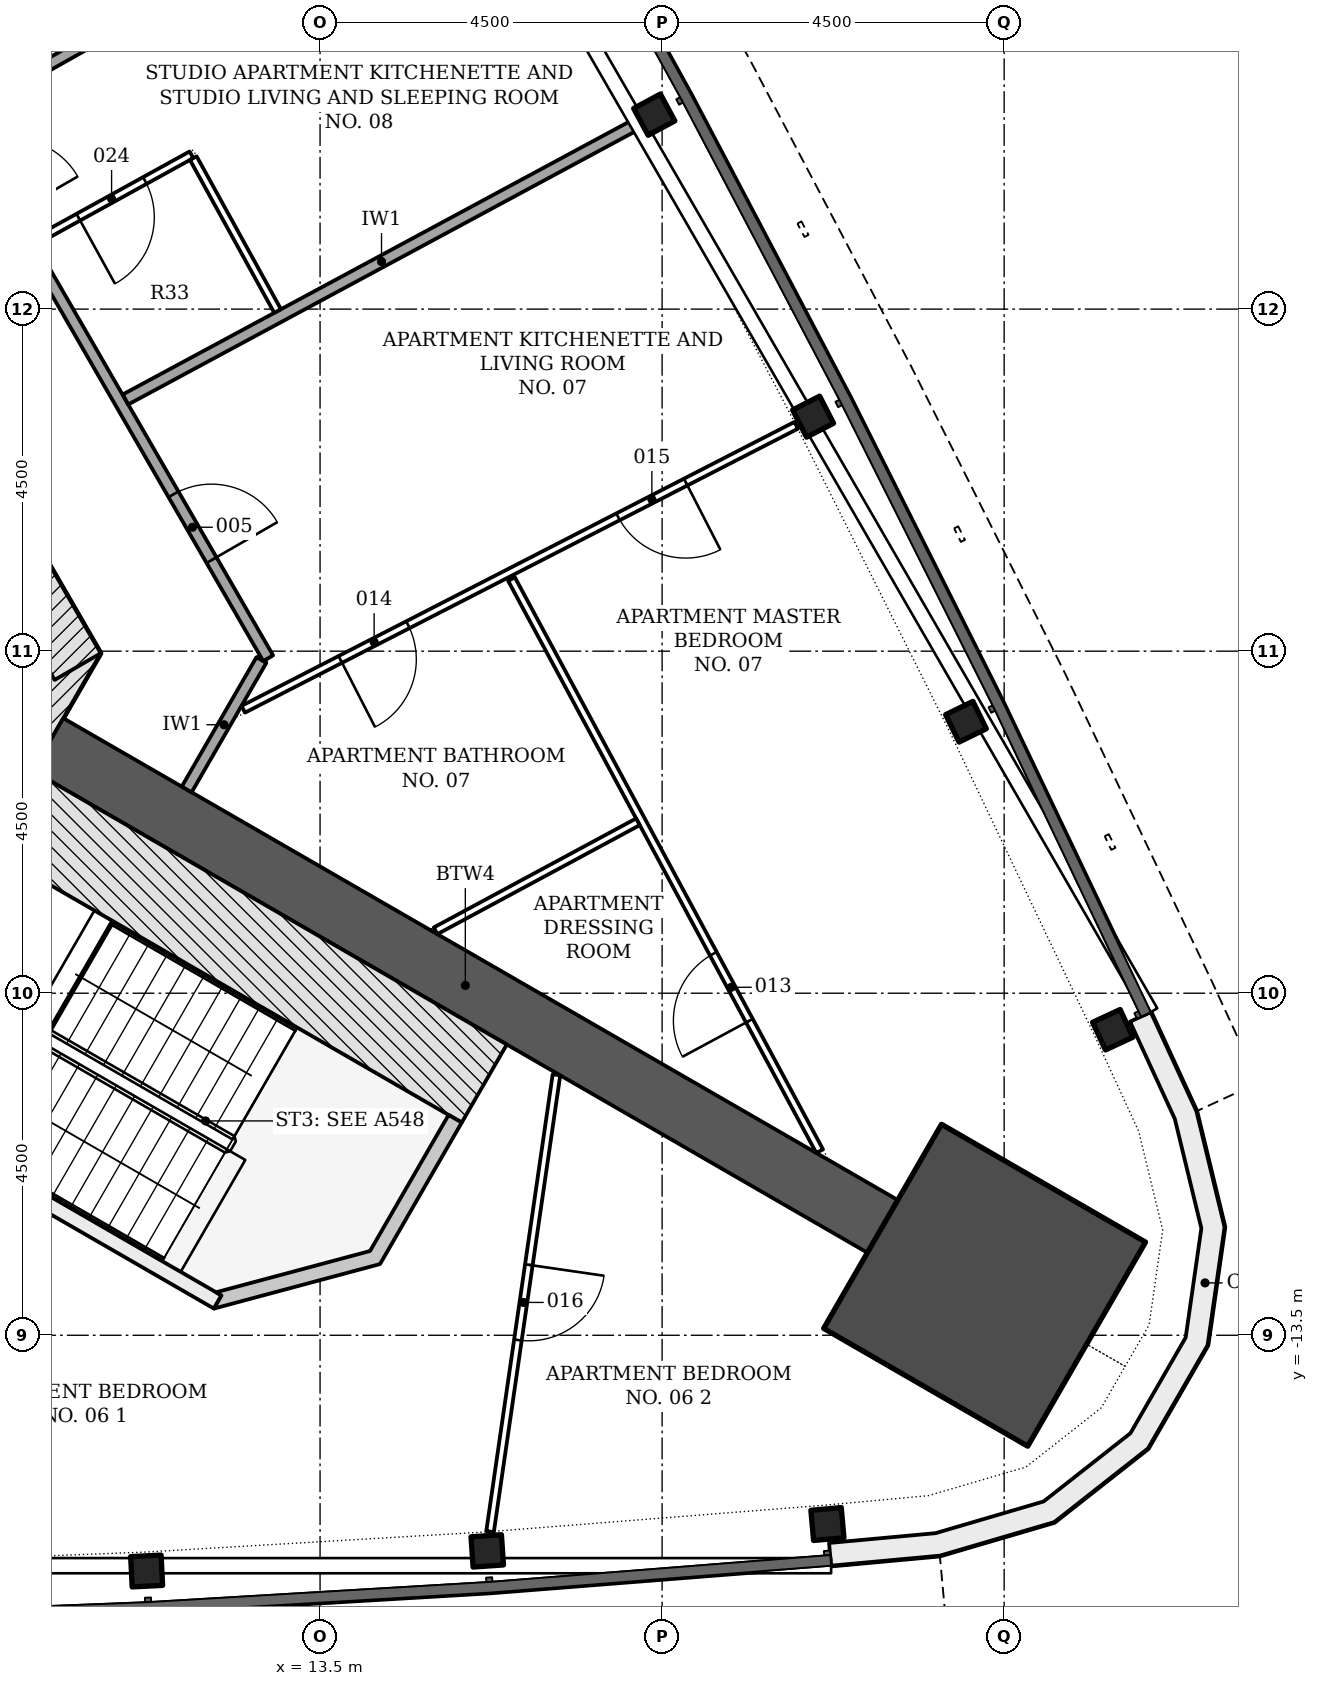
"""IFC4 building model, lengths in metres.
Left out: names, types, materials, properties, quantities, classifications, styles, units other than length and angle.
Written with IfcOpenShell. Run it as: python <this file> out.ifc"""

import sys

from ifc_helpers import new_model, si_unit, direction, frame, frame_2d, origin, origin_2d, place, context, subcontext, project, spatial, polyline, rectangle, i_section, outline, extrude, element, fill, save


model = new_model("IFC4")
c1 = context("Model", 3, precision=1e-05, world=origin(), true_north=direction((0.0, 1.0)))
c2 = subcontext(c1, "Body", "Model", "MODEL_VIEW")
j1 = project(units=[si_unit("LENGTHUNIT", "METRE"), si_unit("PLANEANGLEUNIT", "RADIAN")], contexts=[c1])
p1 = place(None, origin())
s1 = spatial("IfcSite", under=j1, at=p1, CompositionType="ELEMENT")
p2 = place(p1, origin())
s2 = spatial("IfcBuilding", under=s1, at=p2, CompositionType="ELEMENT")
p3 = place(p2, frame((0.0, 0.0, 98.7)))
s3 = spatial("IfcBuildingStorey", under=s2, at=p3, CompositionType="ELEMENT", Elevation=98.7)
p4 = place(p3, frame((8.926, -6.753, -0.2), z_axis=(0.0, 0.0, 1.0), x_axis=(0.500042739161, 0.866000726912, 0.0)))
e1 = element("IfcWall", 1, at=p4, inside=s3, PredefinedType="SHEAR", context=c2, shape_type="SweptSolid", body=[
    extrude(rectangle(XDim=2.771, YDim=0.7, at=frame_2d((1.386, 0.0))), origin(), (0.0, 0.0, 1.0), 3.6),
])
p5 = place(p3, frame((10.311, -4.703, -0.2), z_axis=(0.0, 0.0, 1.0), x_axis=(-0.500001446645, 0.866024568562, 0.0)))
e2 = element("IfcWall", 2, at=p5, inside=s3, PredefinedType="SHEAR", context=c2, shape_type="SweptSolid", body=[
    extrude(rectangle(XDim=18.458, YDim=0.7, at=frame_2d((9.229, 0.0))), origin(), (0.0, 0.0, 1.0), 3.6),
])
p6 = place(p5, frame((6.5, 0.0, 0.2)))
e3 = element("IfcOpeningElement", 3, at=p6, cuts=e2, PredefinedType="OPENING", context=c2, shape_type="SweptSolid", body=[
    extrude(rectangle(XDim=1.0, YDim=2.1, at=frame_2d((0.5, 1.05))), frame((0.0, 0.36, 0.0), z_axis=(0.0, -1.0, 0.0), x_axis=(1.0, 0.0, 0.0)), (0.0, 0.0, 1.0), 0.72),
])
p7 = place(p5, frame((2.902, 0.0, 0.2)))
e4 = element("IfcOpeningElement", 4, at=p7, cuts=e2, PredefinedType="OPENING", context=c2, shape_type="SweptSolid", body=[
    extrude(rectangle(XDim=0.9, YDim=2.1, at=frame_2d((0.45, 1.05))), frame((0.0, 0.36, 0.0), z_axis=(0.0, -1.0, 0.0), x_axis=(1.0, 0.0, 0.0)), (0.0, 0.0, 1.0), 0.72),
])
p8 = place(p5, frame((8.75, 0.0, 0.2)))
e5 = element("IfcOpeningElement", 5, at=p8, cuts=e2, PredefinedType="OPENING", context=c2, shape_type="SweptSolid", body=[
    extrude(rectangle(XDim=1.0, YDim=2.1, at=frame_2d((0.5, 1.05))), frame((0.0, 0.36, 0.0), z_axis=(0.0, -1.0, 0.0), x_axis=(1.0, 0.0, 0.0)), (0.0, 0.0, 1.0), 0.72),
])
p9 = place(p5, frame((13.977, 0.0, 0.2)))
e6 = element("IfcOpeningElement", 6, at=p9, cuts=e2, PredefinedType="OPENING", context=c2, shape_type="SweptSolid", body=[
    extrude(rectangle(XDim=0.9, YDim=2.1, at=frame_2d((0.45, 1.05))), frame((0.0, 0.36, 0.0), z_axis=(0.0, -1.0, 0.0), x_axis=(1.0, 0.0, 0.0)), (0.0, 0.0, 1.0), 0.72),
])
p10 = place(p3, frame((9.922, -5.728, -0.2), z_axis=(0.0, 0.0, 1.0), x_axis=(0.866029086277, -0.499993621681, 0.0)))
e7 = element("IfcWall", 7, at=p10, inside=s3, PredefinedType="SHEAR", context=c2, shape_type="SweptSolid", body=[
    extrude(rectangle(XDim=12.677, YDim=0.8, at=frame_2d((6.339, 0.0))), origin(), (0.0, 0.0, 1.0), 3.6),
])
p11 = place(p3, frame((22.243, -12.842, -0.2), z_axis=(0.0, 0.0, 1.0), x_axis=(0.866025403784, -0.5, 0.0)))
e8 = element("IfcColumn", 8, at=p11, inside=s3, PredefinedType="COLUMN", context=c2, shape_type="SweptSolid", body=[
    extrude(rectangle(XDim=3.1, YDim=3.1, at=origin_2d()), origin(), (0.0, 0.0, 1.0), 3.6),
])
for number, where, z_axis, x_axis in (
    (9, (11.219, -16.601, -0.2), (0.0, 0.0, 1.0), (0.999, 0.049, 0.0)),
    (10, (15.7, -16.336, -0.2), (0.0, 0.0, 1.0), (0.998, 0.069, 0.0)),
    (11, (20.175, -15.983, -0.2), (0.0, 0.0, 1.0), (0.996, 0.088, 0.0)),
    (12, (23.929, -9.48, -0.2), (0.0, 0.0, 1.0), (-0.421, 0.907, 0.0)),
    (13, (21.998, -5.428, -0.2), (0.0, 0.0, 1.0), (-0.439, 0.898, 0.0)),
    (14, (19.986, -1.415, -0.2), (0.0, 0.0, 1.0), (-0.457, 0.89, 0.0)),
    (15, (17.897, 2.558, -0.2), (0.0, 0.0, 1.0), (-0.474, 0.88, 0.0)),
):
    element("IfcColumn", number, at=place(p3, frame(where, z_axis=z_axis, x_axis=x_axis)), inside=s3, PredefinedType="COLUMN", context=c2, shape_type="SweptSolid", body=[
        extrude(i_section(OverallWidth=0.401, OverallDepth=0.399, WebThickness=0.025, FlangeThickness=0.04, FilletRadius=0.015, at=origin_2d()), origin(), (0.0, 0.0, 1.0), 3.6),
    ])
p12 = place(p3, origin())
e16 = element("IfcWall", 16, at=p12, inside=s3, PredefinedType="NOTDEFINED", context=c2, shape_type="SweptSolid", body=[
    extrude(outline(polyline([(20.224, -16.531), (21.654, -16.4), (23.159, -15.958), (24.392, -14.989), (25.177, -13.63), (25.4, -12.077), (25.03, -10.553), (24.428, -9.249), (24.156, -9.374), (24.745, -10.652), (25.094, -12.092), (24.888, -13.53), (24.161, -14.789), (23.019, -15.687), (21.597, -16.104), (20.196, -16.232), (20.224, -16.531)])), origin(), (0.0, 0.0, 1.0), 3.3),
])
p13 = place(p3, frame((7.304, -10.262, -0.2), z_axis=(0.0, 0.0, 1.0), x_axis=(0.866026594901, -0.49999793692, 0.0)))
e17 = element("IfcWall", 17, at=p13, inside=s3, PredefinedType="SHEAR", context=c2, shape_type="SweptSolid", body=[
    extrude(rectangle(XDim=5.6, YDim=0.2, at=frame_2d((2.8, 0.0))), origin(), (0.0, 0.0, 1.0), 3.6),
])
p14 = place(p13, frame((0.45, 0.0, 0.2)))
e18 = element("IfcOpeningElement", 18, at=p14, cuts=e17, PredefinedType="OPENING", context=c2, shape_type="SweptSolid", body=[
    extrude(rectangle(XDim=1.2, YDim=2.1, at=frame_2d((0.6, 1.05))), frame((0.0, 0.11, 0.0), z_axis=(0.0, -1.0, 0.0), x_axis=(1.0, 0.0, 0.0)), (0.0, 0.0, 1.0), 0.22),
])
p15 = place(p3, frame((9.425, -6.588, -0.2), z_axis=(0.0, 0.0, 1.0), x_axis=(0.866018442252, -0.500012057535, 0.0)))
e19 = element("IfcWall", 19, at=p15, inside=s3, PredefinedType="SHEAR", context=c2, shape_type="SweptSolid", body=[
    extrude(rectangle(XDim=7.2, YDim=1.186, at=frame_2d((3.6, 0.0))), origin(), (0.0, 0.0, 1.0), 3.6),
])
p16 = place(p3, frame((0.0, 0.0, -0.2)))
e20 = element("IfcWall", 20, at=p16, inside=s3, PredefinedType="SHEAR", context=c2, shape_type="SweptSolid", body=[
    extrude(outline(polyline([(12.104, -13.149), (14.289, -12.563), (15.364, -10.701), (15.191, -10.601), (14.157, -12.392), (12.132, -12.934), (12.204, -12.976), (12.204, -12.976), (12.204, -12.976), (12.204, -12.976), (12.204, -12.976), (12.204, -12.976), (12.204, -12.976), (12.204, -12.976), (12.204, -12.976), (12.204, -12.976), (12.204, -12.976), (12.204, -12.976), (12.204, -12.976), (12.204, -12.976), (12.204, -12.976), (12.204, -12.976), (12.204, -12.976), (12.104, -13.149)])), origin(), (0.0, 0.0, 1.0), 3.6),
])
p17 = place(p3, frame((5.289, 8.446, 0.0), z_axis=(0.0, 0.0, 1.0), x_axis=(0.499996620721, -0.866027354803, 0.0)))
e21 = element("IfcWall", 21, at=p17, inside=s3, PredefinedType="PARTITIONING", context=c2, shape_type="SweptSolid", body=[
    extrude(rectangle(XDim=15.057, YDim=0.15, at=frame_2d((7.528, 0.0))), origin(), (0.0, 0.0, 1.0), 2.778),
])
p18 = place(p17, frame((12.566, 0.0, 0.0)))
e22 = element("IfcOpeningElement", 22, at=p18, cuts=e21, PredefinedType="OPENING", context=c2, shape_type="SweptSolid", body=[
    extrude(rectangle(XDim=1.0, YDim=2.1, at=frame_2d((0.5, 1.05))), frame((0.0, 0.085, 0.0), z_axis=(0.0, -1.0, 0.0), x_axis=(1.0, 0.0, 0.0)), (0.0, 0.0, 1.0), 0.17),
])
p19 = place(p17, frame((7.316, 0.0, 0.0)))
e23 = element("IfcOpeningElement", 23, at=p19, cuts=e21, PredefinedType="OPENING", context=c2, shape_type="SweptSolid", body=[
    extrude(rectangle(XDim=1.0, YDim=2.1, at=frame_2d((0.5, 1.05))), frame((0.0, 0.085, 0.0), z_axis=(0.0, -1.0, 0.0), x_axis=(1.0, 0.0, 0.0)), (0.0, 0.0, 1.0), 0.17),
])
p20 = place(p17, frame((5.357, 0.0, 0.0)))
e24 = element("IfcOpeningElement", 24, at=p20, cuts=e21, PredefinedType="OPENING", context=c2, shape_type="SweptSolid", body=[
    extrude(rectangle(XDim=1.0, YDim=2.1, at=frame_2d((0.5, 1.05))), frame((0.0, 0.085, 0.0), z_axis=(0.0, -1.0, 0.0), x_axis=(1.0, 0.0, 0.0)), (0.0, 0.0, 1.0), 0.17),
])
p21 = place(p3, frame((11.745, -6.319, 0.0), z_axis=(0.0, 0.0, 1.0), x_axis=(0.500012721296, 0.866018059016, 0.0)))
e25 = element("IfcWall", 25, at=p21, inside=s3, PredefinedType="PARTITIONING", context=c2, shape_type="SweptSolid", body=[
    extrude(rectangle(XDim=1.966, YDim=0.15, at=frame_2d((0.983, 0.0))), origin(), (0.0, 0.0, 1.0), 2.778),
])
p22 = place(p3, frame((15.511, 6.366, 0.0), z_axis=(0.0, 0.0, 1.0), x_axis=(-0.870902291502, -0.491456202175, 0.0)))
e26 = element("IfcWall", 26, at=p22, inside=s3, PredefinedType="PARTITIONING", context=c2, shape_type="SweptSolid", body=[
    extrude(rectangle(XDim=7.738, YDim=0.15, at=frame_2d((3.869, 0.0))), origin(), (0.0, 0.0, 1.0), 2.778),
])
p23 = place(p3, frame((17.677, 2.44, 0.0), z_axis=(0.0, 0.0, 1.0), x_axis=(-0.880400392736, -0.47423111293, 0.0)))
e27 = element("IfcWall", 27, at=p23, inside=s3, PredefinedType="PARTITIONING", context=c2, shape_type="SweptSolid", body=[
    extrude(rectangle(XDim=7.651, YDim=0.15, at=frame_2d((3.826, 0.0))), origin(), (0.0, 0.0, 1.0), 2.778),
])
p24 = place(p3, frame((20.073, -11.078, 0.0), z_axis=(0.0, 0.0, 1.0), x_axis=(-0.474207115322, 0.880413318719, 0.0)))
e28 = element("IfcWall", 28, at=p24, inside=s3, PredefinedType="PARTITIONING", context=c2, shape_type="SweptSolid", body=[
    extrude(rectangle(XDim=8.548, YDim=0.1, at=frame_2d((4.274, 0.0))), origin(), (0.0, 0.0, 1.0), 2.778),
])
p25 = place(p24, frame((1.949, 0.0, 0.0)))
e29 = element("IfcOpeningElement", 29, at=p25, cuts=e28, PredefinedType="OPENING", context=c2, shape_type="SweptSolid", body=[
    extrude(rectangle(XDim=1.0, YDim=2.1, at=frame_2d((0.5, 1.05))), frame((0.0, 0.06, 0.0), z_axis=(0.0, -1.0, 0.0), x_axis=(1.0, 0.0, 0.0)), (0.0, 0.0, 1.0), 0.12),
])
p26 = place(p3, frame((19.764, -1.529, 0.0), z_axis=(0.0, 0.0, 1.0), x_axis=(-0.889562755555, -0.456812985728, 0.0)))
e30 = element("IfcWall", 30, at=p26, inside=s3, PredefinedType="PARTITIONING", context=c2, shape_type="SweptSolid", body=[
    extrude(rectangle(XDim=8.177, YDim=0.1, at=frame_2d((4.089, 0.0))), origin(), (0.0, 0.0, 1.0), 2.778),
])
p27 = place(p26, frame((5.742, 0.0, 0.0)))
e31 = element("IfcOpeningElement", 31, at=p27, cuts=e30, PredefinedType="OPENING", context=c2, shape_type="SweptSolid", body=[
    extrude(rectangle(XDim=1.0, YDim=2.1, at=frame_2d((0.5, 1.05))), frame((0.0, 0.06, 0.0), z_axis=(0.0, -1.0, 0.0), x_axis=(1.0, 0.0, 0.0)), (0.0, 0.0, 1.0), 0.12),
])
p28 = place(p26, frame((1.635, 0.0, 0.0)))
e32 = element("IfcOpeningElement", 32, at=p28, cuts=e30, PredefinedType="OPENING", context=c2, shape_type="SweptSolid", body=[
    extrude(rectangle(XDim=1.0, YDim=2.1, at=frame_2d((0.5, 1.05))), frame((0.0, 0.06, 0.0), z_axis=(0.0, -1.0, 0.0), x_axis=(1.0, 0.0, 0.0)), (0.0, 0.0, 1.0), 0.12),
])
p29 = place(p3, frame((16.61, -10.073, 0.0), z_axis=(0.0, 0.0, 1.0), x_axis=(-0.143841065588, -0.989600802269, 0.0)))
e33 = element("IfcWall", 33, at=p29, inside=s3, PredefinedType="PARTITIONING", context=c2, shape_type="SweptSolid", body=[
    extrude(rectangle(XDim=6.073, YDim=0.1, at=frame_2d((3.037, 0.0))), origin(), (0.0, 0.0, 1.0), 2.923),
])
p30 = place(p29, frame((2.526, 0.0, 0.0)))
e34 = element("IfcOpeningElement", 34, at=p30, cuts=e33, PredefinedType="OPENING", context=c2, shape_type="SweptSolid", body=[
    extrude(rectangle(XDim=1.0, YDim=2.1, at=frame_2d((0.5, 1.05))), frame((0.0, 0.06, 0.0), z_axis=(0.0, -1.0, 0.0), x_axis=(1.0, 0.0, 0.0)), (0.0, 0.0, 1.0), 0.12),
])
p31 = place(p3, frame((17.682, -6.745, 0.0), z_axis=(0.0, 0.0, 1.0), x_axis=(-0.880419251007, -0.474196101267, 0.0)))
e35 = element("IfcWall", 35, at=p31, inside=s3, PredefinedType="PARTITIONING", context=c2, shape_type="SweptSolid", body=[
    extrude(rectangle(XDim=3.024, YDim=0.1, at=frame_2d((1.512, 0.0))), origin(), (0.0, 0.0, 1.0), 3.4),
])
p32 = place(p3, frame((11.808, 2.03, 0.0), z_axis=(0.0, 0.0, 1.0), x_axis=(-0.875678647011, -0.482894302275, 0.0)))
e36 = element("IfcWall", 36, at=p32, inside=s3, PredefinedType="PARTITIONING", context=c2, shape_type="SweptSolid", body=[
    extrude(rectangle(XDim=2.363, YDim=0.1, at=frame_2d((1.181, 0.0))), origin(), (0.0, 0.0, 1.0), 3.4),
])
p33 = place(p32, frame((0.7, 0.0, 0.0)))
e37 = element("IfcOpeningElement", 37, at=p33, cuts=e36, PredefinedType="OPENING", context=c2, shape_type="SweptSolid", body=[
    extrude(rectangle(XDim=1.0, YDim=2.1, at=frame_2d((0.5, 1.05))), frame((0.0, 0.06, 0.0), z_axis=(0.0, -1.0, 0.0), x_axis=(1.0, 0.0, 0.0)), (0.0, 0.0, 1.0), 0.12),
])
p34 = place(p3, frame((12.941, -0.025, 0.0), z_axis=(0.0, 0.0, 1.0), x_axis=(-0.482860975889, 0.875697024069, 0.0)))
e38 = element("IfcWall", 38, at=p34, inside=s3, PredefinedType="PARTITIONING", context=c2, shape_type="SweptSolid", body=[
    extrude(rectangle(XDim=2.297, YDim=0.1, at=frame_2d((1.148, 0.0))), origin(), (0.0, 0.0, 1.0), 2.778),
])
p35 = place(p18, origin())
e39 = element("IfcDoor", 39, at=p35, inside=s3, OperationType="SINGLE_SWING_RIGHT", PredefinedType="DOOR", context=c2, shape_type="SweptSolid", body=[
    extrude(rectangle(XDim=1.0, YDim=2.1, at=frame_2d((0.5, 1.05))), frame((0.0, 0.025, 0.0), z_axis=(0.0, -1.0, 0.0), x_axis=(1.0, 0.0, 0.0)), (0.0, 0.0, 1.0), 0.05),
])
fill(e22, e39)
p36 = place(p25, origin())
e40 = element("IfcDoor", 40, at=p36, inside=s3, OperationType="SINGLE_SWING_LEFT", PredefinedType="DOOR", context=c2, shape_type="SweptSolid", body=[
    extrude(rectangle(XDim=1.0, YDim=2.1, at=frame_2d((0.5, 1.05))), frame((0.0, 0.025, 0.0), z_axis=(0.0, -1.0, 0.0), x_axis=(1.0, 0.0, 0.0)), (0.0, 0.0, 1.0), 0.05),
])
fill(e29, e40)
p37 = place(p27, origin())
e41 = element("IfcDoor", 41, at=p37, inside=s3, OperationType="SINGLE_SWING_RIGHT", PredefinedType="DOOR", context=c2, shape_type="SweptSolid", body=[
    extrude(rectangle(XDim=1.0, YDim=2.1, at=frame_2d((0.5, 1.05))), frame((0.0, 0.025, 0.0), z_axis=(0.0, -1.0, 0.0), x_axis=(1.0, 0.0, 0.0)), (0.0, 0.0, 1.0), 0.05),
])
fill(e31, e41)
p38 = place(p28, origin())
e42 = element("IfcDoor", 42, at=p38, inside=s3, OperationType="SINGLE_SWING_LEFT", PredefinedType="DOOR", context=c2, shape_type="SweptSolid", body=[
    extrude(rectangle(XDim=1.0, YDim=2.1, at=frame_2d((0.5, 1.05))), frame((0.0, 0.025, 0.0), z_axis=(0.0, -1.0, 0.0), x_axis=(1.0, 0.0, 0.0)), (0.0, 0.0, 1.0), 0.05),
])
fill(e32, e42)
p39 = place(p30, origin())
e43 = element("IfcDoor", 43, at=p39, inside=s3, OperationType="SINGLE_SWING_LEFT", PredefinedType="DOOR", context=c2, shape_type="SweptSolid", body=[
    extrude(rectangle(XDim=1.0, YDim=2.1, at=frame_2d((0.5, 1.05))), frame((0.0, 0.025, 0.0), z_axis=(0.0, -1.0, 0.0), x_axis=(1.0, 0.0, 0.0)), (0.0, 0.0, 1.0), 0.05),
])
fill(e34, e43)
p40 = place(p33, origin())
e44 = element("IfcDoor", 44, at=p40, inside=s3, OperationType="SINGLE_SWING_RIGHT", PredefinedType="DOOR", context=c2, shape_type="SweptSolid", body=[
    extrude(rectangle(XDim=1.0, YDim=2.1, at=frame_2d((0.5, 1.05))), frame((0.0, 0.025, 0.0), z_axis=(0.0, -1.0, 0.0), x_axis=(1.0, 0.0, 0.0)), (0.0, 0.0, 1.0), 0.05),
])
fill(e37, e44)
save(model, sys.argv[1])
